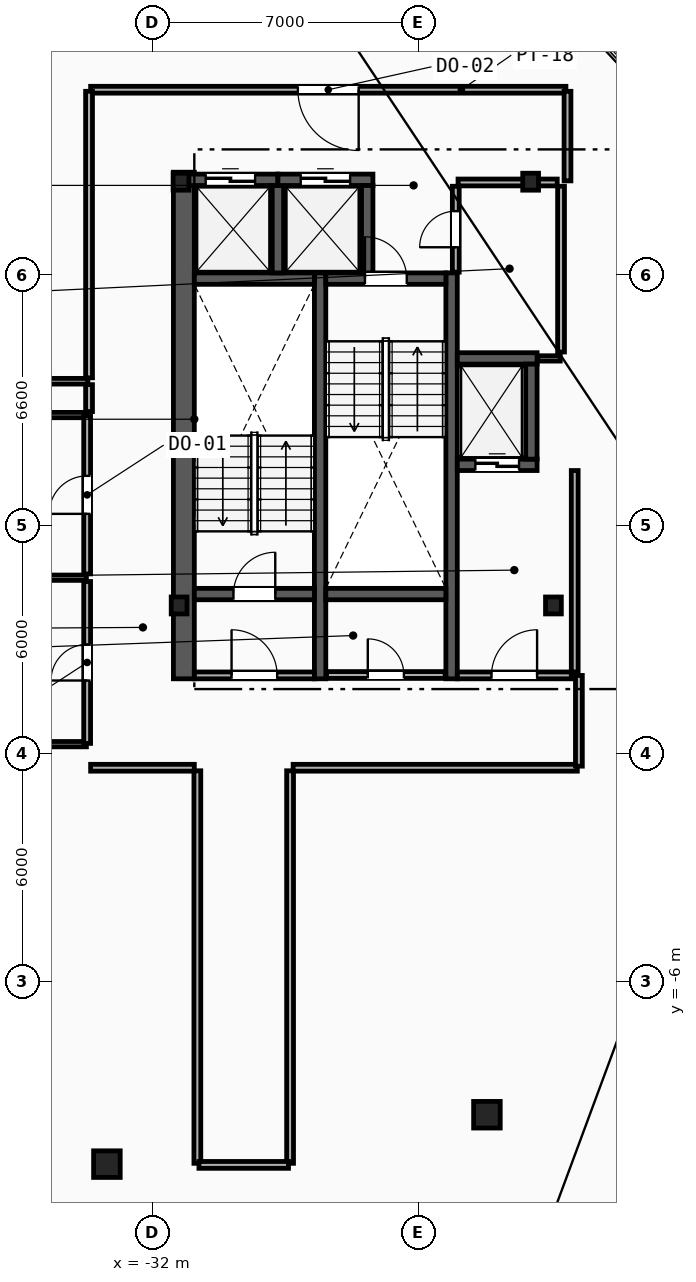
"""IFC4 building model, lengths in metres.
Left out: names, types, materials, properties, quantities, classifications, styles, units other than length and angle.
Written with IfcOpenShell. Run it as: python <this file> out.ifc"""

import sys

from ifc_helpers import new_model, si_unit, direction, frame, frame_2d, origin, origin_2d, place, context, subcontext, project, spatial, rectangle, i_section, extrude, element, fill, save


model = new_model("IFC4")
c1 = context("Model", 3, precision=1e-05, world=origin(), true_north=direction((0.0, 1.0)))
c2 = subcontext(c1, "Body", "Model", "MODEL_VIEW")
j1 = project(units=[si_unit("LENGTHUNIT", "METRE"), si_unit("PLANEANGLEUNIT", "RADIAN")], contexts=[c1])
p1 = place(None, origin())
s1 = spatial("IfcSite", under=j1, at=p1, CompositionType="ELEMENT")
p2 = place(p1, origin())
s2 = spatial("IfcBuilding", under=s1, at=p2, CompositionType="ELEMENT")
p3 = place(p2, frame((0.0, 0.0, 275.6)))
s3 = spatial("IfcBuildingStorey", under=s2, at=p3, CompositionType="ELEMENT", Elevation=275.6)
for number, where, z_axis, x_axis in (
    (1, (-31.3, 3.9, 0.0), (0.0, 0.0, 1.0), (1.0, 0.0, 0.0)),
    (2, (-21.45, 3.9, 0.0), (0.0, 0.0, 1.0), (1.0, 0.0, 0.0)),
    (3, (-22.05, 15.05, 0.0), (0.0, 0.0, 1.0), (1.0, 0.0, 0.0)),
    (4, (-31.25, 15.05, 0.0), (0.0, 0.0, 1.0), (1.0, 0.0, 0.0)),
):
    element("IfcColumn", number, at=place(p3, frame(where, z_axis=z_axis, x_axis=x_axis)), inside=s3, PredefinedType="COLUMN", context=c2, shape_type="SweptSolid", body=[
        extrude(i_section(OverallWidth=0.416, OverallDepth=0.446, WebThickness=0.039, FlangeThickness=0.063, FilletRadius=0.018, at=origin_2d()), origin(), (0.0, 0.0, 1.0), 3.6),
    ])
for number, where, z_axis, x_axis in (
    (5, (-33.2, -10.8, 0.0), (0.0, 0.0, 1.0), (1.0, 0.0, 0.0)),
    (6, (-23.2, -9.5, 0.0), (0.0, 0.0, 1.0), (1.0, 0.0, 0.0)),
):
    element("IfcColumn", number, at=place(p3, frame(where, z_axis=z_axis, x_axis=x_axis)), inside=s3, PredefinedType="COLUMN", context=c2, shape_type="SweptSolid", body=[
        extrude(rectangle(XDim=0.7, YDim=0.7, at=origin_2d()), origin(), (0.0, 0.0, 1.0), 3.6),
    ])
p4 = place(p3, frame((-31.175, 1.97, 0.0), z_axis=(0.0, 0.0, 1.0), x_axis=(0.0, 1.0, 0.0)))
e7 = element("IfcWall", 7, at=p4, inside=s3, PredefinedType="SHEAR", context=c2, shape_type="SweptSolid", body=[
    extrude(rectangle(XDim=13.33, YDim=0.55, at=frame_2d((6.665, 0.0))), origin(), (0.0, 0.0, 1.0), 3.34),
])
for number, where, z_axis, x_axis in (
    (8, (-27.59, 1.97, 0.0), (0.0, 0.0, 1.0), (0.0, 1.0, 0.0)),
    (9, (-24.13, 1.97, 0.0), (0.0, 0.0, 1.0), (0.0, 1.0, 0.0)),
):
    element("IfcWall", number, at=place(p3, frame(where, z_axis=z_axis, x_axis=x_axis)), inside=s3, PredefinedType="SHEAR", context=c2, shape_type="SweptSolid", body=[
        extrude(rectangle(XDim=10.68, YDim=0.3, at=frame_2d((5.34, 0.0))), origin(), (0.0, 0.0, 1.0), 3.34),
    ])
p5 = place(p3, frame((-30.9, 4.2, 0.0), z_axis=(0.0, 0.0, 1.0), x_axis=(1.0, 0.0, 0.0)))
e10 = element("IfcWall", 10, at=p5, inside=s3, PredefinedType="SHEAR", context=c2, shape_type="SweptSolid", body=[
    extrude(rectangle(XDim=3.16, YDim=0.3, at=frame_2d((1.58, 0.0))), origin(), (0.0, 0.0, 1.0), 3.34),
])
p6 = place(p5, frame((1.03, 0.0, 0.0)))
e11 = element("IfcOpeningElement", 11, at=p6, cuts=e10, PredefinedType="OPENING", context=c2, shape_type="SweptSolid", body=[
    extrude(rectangle(XDim=1.1, YDim=2.15, at=frame_2d((0.55, 1.075))), frame((0.0, 0.16, 0.0), z_axis=(0.0, -1.0, 0.0), x_axis=(1.0, 0.0, 0.0)), (0.0, 0.0, 1.0), 0.32),
])
p7 = place(p3, frame((-30.9, 12.5, 0.0), z_axis=(0.0, 0.0, 1.0), x_axis=(1.0, 0.0, 0.0)))
e12 = element("IfcWall", 12, at=p7, inside=s3, PredefinedType="SHEAR", context=c2, shape_type="SweptSolid", body=[
    extrude(rectangle(XDim=3.16, YDim=0.3, at=frame_2d((1.58, 0.0))), origin(), (0.0, 0.0, 1.0), 3.34),
])
p8 = place(p3, frame((-27.44, 12.5, 0.0), z_axis=(0.0, 0.0, 1.0), x_axis=(1.0, 0.0, 0.0)))
e13 = element("IfcWall", 13, at=p8, inside=s3, PredefinedType="SHEAR", context=c2, shape_type="SweptSolid", body=[
    extrude(rectangle(XDim=3.16, YDim=0.3, at=frame_2d((1.58, 0.0))), origin(), (0.0, 0.0, 1.0), 3.34),
])
p9 = place(p8, frame((1.03, 0.0, 0.0)))
e14 = element("IfcOpeningElement", 14, at=p9, cuts=e13, PredefinedType="OPENING", context=c2, shape_type="SweptSolid", body=[
    extrude(rectangle(XDim=1.1, YDim=2.15, at=frame_2d((0.55, 1.075))), frame((0.0, 0.16, 0.0), z_axis=(0.0, -1.0, 0.0), x_axis=(1.0, 0.0, 0.0)), (0.0, 0.0, 1.0), 0.32),
])
p10 = place(p3, frame((-27.44, 4.2, 0.0), z_axis=(0.0, 0.0, 1.0), x_axis=(1.0, 0.0, 0.0)))
e15 = element("IfcWall", 15, at=p10, inside=s3, PredefinedType="SHEAR", context=c2, shape_type="SweptSolid", body=[
    extrude(rectangle(XDim=3.16, YDim=0.3, at=frame_2d((1.58, 0.0))), origin(), (0.0, 0.0, 1.0), 3.34),
])
p11 = place(p3, frame((-20.89, 2.15, 0.0), z_axis=(0.0, 0.0, 1.0), x_axis=(0.0, 1.0, 0.0)))
e16 = element("IfcWall", 16, at=p11, inside=s3, PredefinedType="PARTITIONING", context=c2, shape_type="SweptSolid", body=[
    extrude(rectangle(XDim=5.3, YDim=0.18, at=frame_2d((2.65, 0.0))), origin(), (0.0, 0.0, 1.0), 3.34),
])
p12 = place(p3, frame((-23.98, 2.06, 0.0), z_axis=(0.0, 0.0, 1.0), x_axis=(1.0, 0.0, 0.0)))
e17 = element("IfcWall", 17, at=p12, inside=s3, PredefinedType="PARTITIONING", context=c2, shape_type="SweptSolid", body=[
    extrude(rectangle(XDim=3.0, YDim=0.18, at=frame_2d((1.5, 0.0))), origin(), (0.0, 0.0, 1.0), 3.34),
])
p13 = place(p12, frame((0.9, 0.0, 0.0)))
e18 = element("IfcOpeningElement", 18, at=p13, cuts=e17, PredefinedType="OPENING", context=c2, shape_type="SweptSolid", body=[
    extrude(rectangle(XDim=1.2, YDim=2.15, at=frame_2d((0.6, 1.075))), frame((0.0, 0.1, 0.0), z_axis=(0.0, -1.0, 0.0), x_axis=(1.0, 0.0, 0.0)), (0.0, 0.0, 1.0), 0.2),
])
p14 = place(p3, frame((-30.9, 2.06, 0.0), z_axis=(0.0, 0.0, 1.0), x_axis=(1.0, 0.0, 0.0)))
e19 = element("IfcWall", 19, at=p14, inside=s3, PredefinedType="PARTITIONING", context=c2, shape_type="SweptSolid", body=[
    extrude(rectangle(XDim=3.16, YDim=0.18, at=frame_2d((1.58, 0.0))), origin(), (0.0, 0.0, 1.0), 3.34),
])
p15 = place(p14, frame((0.98, 0.0, 0.0)))
e20 = element("IfcOpeningElement", 20, at=p15, cuts=e19, PredefinedType="OPENING", context=c2, shape_type="SweptSolid", body=[
    extrude(rectangle(XDim=1.2, YDim=2.15, at=frame_2d((0.6, 1.075))), frame((0.0, 0.1, 0.0), z_axis=(0.0, -1.0, 0.0), x_axis=(1.0, 0.0, 0.0)), (0.0, 0.0, 1.0), 0.2),
])
p16 = place(p3, frame((-23.98, 7.6, 0.0), z_axis=(0.0, 0.0, 1.0), x_axis=(1.0, 0.0, 0.0)))
e21 = element("IfcWall", 21, at=p16, inside=s3, PredefinedType="SHEAR", context=c2, shape_type="SweptSolid", body=[
    extrude(rectangle(XDim=2.1, YDim=0.3, at=frame_2d((1.05, 0.0))), origin(), (0.0, 0.0, 1.0), 3.34),
])
p17 = place(p16, frame((0.475, 0.0, 0.0)))
e22 = element("IfcOpeningElement", 22, at=p17, cuts=e21, PredefinedType="OPENING", context=c2, shape_type="SweptSolid", body=[
    extrude(rectangle(XDim=1.15, YDim=2.2, at=frame_2d((0.575, 1.1))), frame((0.0, 0.16, 0.0), z_axis=(0.0, -1.0, 0.0), x_axis=(1.0, 0.0, 0.0)), (0.0, 0.0, 1.0), 0.32),
])
p18 = place(p3, frame((-23.98, 10.4, 0.0), z_axis=(0.0, 0.0, 1.0), x_axis=(1.0, 0.0, 0.0)))
e23 = element("IfcWall", 23, at=p18, inside=s3, PredefinedType="SHEAR", context=c2, shape_type="SweptSolid", body=[
    extrude(rectangle(XDim=2.1, YDim=0.3, at=frame_2d((1.05, 0.0))), origin(), (0.0, 0.0, 1.0), 3.34),
])
p19 = place(p3, frame((-22.03, 7.75, 0.0), z_axis=(0.0, 0.0, 1.0), x_axis=(0.0, 1.0, 0.0)))
e24 = element("IfcWall", 24, at=p19, inside=s3, PredefinedType="SHEAR", context=c2, shape_type="SweptSolid", body=[
    extrude(rectangle(XDim=2.5, YDim=0.3, at=frame_2d((1.25, 0.0))), origin(), (0.0, 0.0, 1.0), 3.34),
])
p20 = place(p3, frame((-31.2, 15.1, 0.0), z_axis=(0.0, 0.0, 1.0), x_axis=(1.0, 0.0, 0.0)))
e25 = element("IfcWall", 25, at=p20, inside=s3, PredefinedType="SHEAR", context=c2, shape_type="SweptSolid", body=[
    extrude(rectangle(XDim=2.5, YDim=0.3, at=frame_2d((1.25, 0.0))), origin(), (0.0, 0.0, 1.0), 3.34),
])
p21 = place(p20, frame((0.6, 0.0, 0.0)))
e26 = element("IfcOpeningElement", 26, at=p21, cuts=e25, PredefinedType="OPENING", context=c2, shape_type="SweptSolid", body=[
    extrude(rectangle(XDim=1.3, YDim=2.2, at=frame_2d((0.65, 1.1))), frame((0.0, 0.16, 0.0), z_axis=(0.0, -1.0, 0.0), x_axis=(1.0, 0.0, 0.0)), (0.0, 0.0, 1.0), 0.32),
])
p22 = place(p3, frame((-28.7, 12.65, 0.0), z_axis=(0.0, 0.0, 1.0), x_axis=(0.0, 1.0, 0.0)))
e27 = element("IfcWall", 27, at=p22, inside=s3, PredefinedType="SHEAR", context=c2, shape_type="SweptSolid", body=[
    extrude(rectangle(XDim=2.3, YDim=0.3, at=frame_2d((1.15, 0.0))), origin(), (0.0, 0.0, 1.0), 3.34),
])
p23 = place(p3, frame((-28.7, 15.1, 0.0), z_axis=(0.0, 0.0, 1.0), x_axis=(1.0, 0.0, 0.0)))
e28 = element("IfcWall", 28, at=p23, inside=s3, PredefinedType="SHEAR", context=c2, shape_type="SweptSolid", body=[
    extrude(rectangle(XDim=2.5, YDim=0.3, at=frame_2d((1.25, 0.0))), origin(), (0.0, 0.0, 1.0), 3.34),
])
p24 = place(p23, frame((0.6, 0.0, 0.0)))
e29 = element("IfcOpeningElement", 29, at=p24, cuts=e28, PredefinedType="OPENING", context=c2, shape_type="SweptSolid", body=[
    extrude(rectangle(XDim=1.3, YDim=2.2, at=frame_2d((0.65, 1.1))), frame((0.0, 0.16, 0.0), z_axis=(0.0, -1.0, 0.0), x_axis=(1.0, 0.0, 0.0)), (0.0, 0.0, 1.0), 0.32),
])
p25 = place(p3, frame((-26.35, 12.65, 0.0), z_axis=(0.0, 0.0, 1.0), x_axis=(0.0, 1.0, 0.0)))
e30 = element("IfcWall", 30, at=p25, inside=s3, PredefinedType="SHEAR", context=c2, shape_type="SweptSolid", body=[
    extrude(rectangle(XDim=2.3, YDim=0.3, at=frame_2d((1.15, 0.0))), origin(), (0.0, 0.0, 1.0), 3.34),
])
p26 = place(p3, frame((-21.86, 10.4, 0.0), z_axis=(0.0, 0.0, 1.0), x_axis=(1.0, 0.0, 0.0)))
e31 = element("IfcWall", 31, at=p26, inside=s3, PredefinedType="PARTITIONING", context=c2, shape_type="SweptSolid", body=[
    extrude(rectangle(XDim=0.59, YDim=0.14, at=frame_2d((0.295, 0.0))), origin(), (0.0, 0.0, 1.0), 3.34),
])
p27 = place(p3, frame((-21.25, 10.57, 0.0), z_axis=(0.0, 0.0, 1.0), x_axis=(0.0, 1.0, 0.0)))
e32 = element("IfcWall", 32, at=p27, inside=s3, PredefinedType="PARTITIONING", context=c2, shape_type="SweptSolid", body=[
    extrude(rectangle(XDim=4.36, YDim=0.18, at=frame_2d((2.18, 0.0))), origin(), (0.0, 0.0, 1.0), 3.34),
])
p28 = place(p3, frame((-23.96, 15.03, 0.0), z_axis=(0.0, 0.0, 1.0), x_axis=(1.0, 0.0, 0.0)))
e33 = element("IfcWall", 33, at=p28, inside=s3, PredefinedType="PARTITIONING", context=c2, shape_type="SweptSolid", body=[
    extrude(rectangle(XDim=2.61, YDim=0.18, at=frame_2d((1.305, 0.0))), origin(), (0.0, 0.0, 1.0), 2.413),
])
p29 = place(p3, frame((-27.42, 2.07, 0.0), z_axis=(0.0, 0.0, 1.0), x_axis=(1.0, 0.0, 0.0)))
e34 = element("IfcWall", 34, at=p29, inside=s3, PredefinedType="PARTITIONING", context=c2, shape_type="SweptSolid", body=[
    extrude(rectangle(XDim=3.12, YDim=0.18, at=frame_2d((1.56, 0.0))), origin(), (0.0, 0.0, 1.0), 3.34),
])
p30 = place(p29, frame((1.085, 0.0, 0.0)))
e35 = element("IfcOpeningElement", 35, at=p30, cuts=e34, PredefinedType="OPENING", context=c2, shape_type="SweptSolid", body=[
    extrude(rectangle(XDim=0.95, YDim=2.1, at=frame_2d((0.475, 1.05))), frame((0.0, 0.1, 0.0), z_axis=(0.0, -1.0, 0.0), x_axis=(1.0, 0.0, 0.0)), (0.0, 0.0, 1.0), 0.2),
])
p31 = place(p3, frame((-24.02, 12.67, 0.0), z_axis=(0.0, 0.0, 1.0), x_axis=(0.0, 1.0, 0.0)))
e36 = element("IfcWall", 36, at=p31, inside=s3, PredefinedType="PARTITIONING", context=c2, shape_type="SweptSolid", body=[
    extrude(rectangle(XDim=2.26, YDim=0.18, at=frame_2d((1.13, 0.0))), origin(), (0.0, 0.0, 1.0), 3.34),
])
p32 = place(p31, frame((0.655, 0.0, 0.0)))
e37 = element("IfcOpeningElement", 37, at=p32, cuts=e36, PredefinedType="OPENING", context=c2, shape_type="SweptSolid", body=[
    extrude(rectangle(XDim=0.95, YDim=2.1, at=frame_2d((0.475, 1.05))), frame((0.0, 0.1, 0.0), z_axis=(0.0, -1.0, 0.0), x_axis=(1.0, 0.0, 0.0)), (0.0, 0.0, 1.0), 0.2),
])
for number, where, z_axis, x_axis in (
    (38, (-38.22, 0.25, 0.0), (0.0, 0.0, 1.0), (1.0, 0.0, 0.0)),
    (39, (-38.22, 4.63, 0.0), (0.0, 0.0, 1.0), (1.0, 0.0, 0.0)),
    (40, (-38.22, 8.91, 0.0), (0.0, 0.0, 1.0), (1.0, 0.0, 0.0)),
):
    element("IfcWall", number, at=place(p3, frame(where, z_axis=z_axis, x_axis=x_axis)), inside=s3, PredefinedType="PARTITIONING", context=c2, shape_type="SweptSolid", body=[
        extrude(rectangle(XDim=4.48, YDim=0.14, at=frame_2d((2.24, 0.0))), origin(), (0.0, 0.0, 1.0), 3.34),
    ])
p33 = place(p3, frame((-33.72, 0.27, 0.0), z_axis=(0.0, 0.0, 1.0), x_axis=(0.0, 1.0, 0.0)))
e41 = element("IfcWall", 41, at=p33, inside=s3, PredefinedType="PARTITIONING", context=c2, shape_type="SweptSolid", body=[
    extrude(rectangle(XDim=4.26, YDim=0.18, at=frame_2d((2.13, 0.0))), origin(), (0.0, 0.0, 1.0), 3.34),
])
p34 = place(p33, frame((1.655, 0.0, 0.0)))
e42 = element("IfcOpeningElement", 42, at=p34, cuts=e41, PredefinedType="OPENING", context=c2, shape_type="SweptSolid", body=[
    extrude(rectangle(XDim=0.95, YDim=2.1, at=frame_2d((0.475, 1.05))), frame((0.0, 0.1, 0.0), z_axis=(0.0, -1.0, 0.0), x_axis=(1.0, 0.0, 0.0)), (0.0, 0.0, 1.0), 0.2),
])
p35 = place(p3, frame((-33.72, 4.73, 0.0), z_axis=(0.0, 0.0, 1.0), x_axis=(0.0, 1.0, 0.0)))
e43 = element("IfcWall", 43, at=p35, inside=s3, PredefinedType="PARTITIONING", context=c2, shape_type="SweptSolid", body=[
    extrude(rectangle(XDim=4.16, YDim=0.18, at=frame_2d((2.08, 0.0))), origin(), (0.0, 0.0, 1.0), 3.34),
])
p36 = place(p35, frame((1.58, 0.0, 0.0)))
e44 = element("IfcOpeningElement", 44, at=p36, cuts=e43, PredefinedType="OPENING", context=c2, shape_type="SweptSolid", body=[
    extrude(rectangle(XDim=1.0, YDim=2.15, at=frame_2d((0.5, 1.075))), frame((0.0, 0.1, 0.0), z_axis=(0.0, -1.0, 0.0), x_axis=(1.0, 0.0, 0.0)), (0.0, 0.0, 1.0), 0.2),
])
p37 = place(p3, frame((-48.38, 9.8, 0.0), z_axis=(0.0, 0.0, 1.0), x_axis=(1.0, 0.0, 0.0)))
e45 = element("IfcWall", 45, at=p37, inside=s3, PredefinedType="PARTITIONING", context=c2, shape_type="SweptSolid", body=[
    extrude(rectangle(XDim=14.68, YDim=0.15, at=frame_2d((7.34, 0.0))), origin(), (0.0, 0.0, 1.0), 3.34),
])
p38 = place(p3, frame((-21.122, 17.47, 0.0), z_axis=(0.0, 0.0, 1.0), x_axis=(-1.0, 0.0, 0.0)))
e46 = element("IfcWall", 46, at=p38, inside=s3, PredefinedType="PARTITIONING", context=c2, shape_type="SweptSolid", body=[
    extrude(rectangle(XDim=12.507, YDim=0.18, at=frame_2d((6.253, 0.0))), origin(), (0.0, 0.0, 1.0), 3.34),
])
p39 = place(p38, frame((5.454, 0.0, 0.0)))
e47 = element("IfcOpeningElement", 47, at=p39, cuts=e46, PredefinedType="OPENING", context=c2, shape_type="SweptSolid", body=[
    extrude(rectangle(XDim=1.6, YDim=2.2, at=frame_2d((0.8, 1.1))), frame((0.0, 0.1, 0.0), z_axis=(0.0, -1.0, 0.0), x_axis=(1.0, 0.0, 0.0)), (0.0, 0.0, 1.0), 0.2),
])
for number, where, z_axis, x_axis in (
    (48, (-30.82, -0.45, 0.0), (0.0, 0.0, 1.0), (0.0, -1.0, 0.0)),
    (49, (-28.38, -10.779, 0.0), (0.0, 0.0, 1.0), (0.0, 1.0, 0.0)),
):
    element("IfcWall", number, at=place(p3, frame(where, z_axis=z_axis, x_axis=x_axis)), inside=s3, PredefinedType="PARTITIONING", context=c2, shape_type="SweptSolid", body=[
        extrude(rectangle(XDim=10.329, YDim=0.18, at=frame_2d((5.164, 0.0))), origin(), (0.0, 0.0, 1.0), 3.34),
    ])
p40 = place(p3, frame((-33.67, 17.428, 0.0), z_axis=(0.0, 0.0, 1.0), x_axis=(0.0, -1.0, 0.0)))
e50 = element("IfcWall", 50, at=p40, inside=s3, PredefinedType="PARTITIONING", context=c2, shape_type="SweptSolid", body=[
    extrude(rectangle(XDim=7.539, YDim=0.18, at=frame_2d((3.769, 0.0))), origin(), (0.0, 0.0, 1.0), 3.34),
])
p41 = place(p3, frame((-28.3, -0.37, 0.0), z_axis=(0.0, 0.0, 1.0), x_axis=(1.0, 0.0, 0.0)))
e51 = element("IfcWall", 51, at=p41, inside=s3, PredefinedType="PARTITIONING", context=c2, shape_type="SweptSolid", body=[
    extrude(rectangle(XDim=7.479, YDim=0.18, at=frame_2d((3.739, 0.0))), origin(), (0.0, 0.0, 1.0), 3.34),
])
p42 = place(p3, frame((-33.628, -0.37, 0.0), z_axis=(0.0, 0.0, 1.0), x_axis=(1.0, 0.0, 0.0)))
e52 = element("IfcWall", 52, at=p42, inside=s3, PredefinedType="PARTITIONING", context=c2, shape_type="SweptSolid", body=[
    extrude(rectangle(XDim=2.729, YDim=0.18, at=frame_2d((1.364, 0.0))), origin(), (0.0, 0.0, 1.0), 3.34),
])
p43 = place(p3, frame((-20.78, -0.329, 0.0), z_axis=(0.0, 0.0, 1.0), x_axis=(0.0, 1.0, 0.0)))
e53 = element("IfcWall", 53, at=p43, inside=s3, PredefinedType="PARTITIONING", context=c2, shape_type="SweptSolid", body=[
    extrude(rectangle(XDim=2.387, YDim=0.18, at=frame_2d((1.194, 0.0))), origin(), (0.0, 0.0, 1.0), 3.34),
])
p44 = place(p3, frame((-30.779, -10.82, 0.0), z_axis=(0.0, 0.0, 1.0), x_axis=(1.0, 0.0, 0.0)))
e54 = element("IfcWall", 54, at=p44, inside=s3, PredefinedType="PARTITIONING", context=c2, shape_type="SweptSolid", body=[
    extrude(rectangle(XDim=2.357, YDim=0.18, at=frame_2d((1.179, 0.0))), origin(), (0.0, 0.0, 1.0), 3.34),
])
p45 = place(p3, frame((-21.08, 15.072, 0.0), z_axis=(0.0, 0.0, 1.0), x_axis=(0.0, 1.0, 0.0)))
e55 = element("IfcWall", 55, at=p45, inside=s3, PredefinedType="PARTITIONING", context=c2, shape_type="SweptSolid", body=[
    extrude(rectangle(XDim=2.357, YDim=0.18, at=frame_2d((1.178, 0.0))), origin(), (0.0, 0.0, 1.0), 3.34),
])
p46 = place(p3, frame((-33.67, 9.71, 0.0), z_axis=(0.0, 0.0, 1.0), x_axis=(0.0, -1.0, 0.0)))
e56 = element("IfcWall", 56, at=p46, inside=s3, PredefinedType="PARTITIONING", context=c2, shape_type="SweptSolid", body=[
    extrude(rectangle(XDim=0.708, YDim=0.18, at=frame_2d((0.354, 0.0))), origin(), (0.0, 0.0, 1.0), 3.34),
])
p47 = place(p6, origin())
e57 = element("IfcDoor", 57, at=p47, inside=s3, OperationType="SINGLE_SWING_RIGHT", PredefinedType="DOOR", context=c2, shape_type="SweptSolid", body=[
    extrude(rectangle(XDim=1.1, YDim=2.15, at=frame_2d((0.55, 1.075))), frame((0.0, 0.025, 0.0), z_axis=(0.0, -1.0, 0.0), x_axis=(1.0, 0.0, 0.0)), (0.0, 0.0, 1.0), 0.05),
])
fill(e11, e57)
p48 = place(p9, origin())
e58 = element("IfcDoor", 58, at=p48, inside=s3, OperationType="SINGLE_SWING_LEFT", PredefinedType="DOOR", context=c2, shape_type="SweptSolid", body=[
    extrude(rectangle(XDim=1.1, YDim=2.15, at=frame_2d((0.55, 1.075))), frame((0.0, 0.025, 0.0), z_axis=(0.0, -1.0, 0.0), x_axis=(1.0, 0.0, 0.0)), (0.0, 0.0, 1.0), 0.05),
])
fill(e14, e58)
p49 = place(p13, origin())
e59 = element("IfcDoor", 59, at=p49, inside=s3, OperationType="SINGLE_SWING_RIGHT", PredefinedType="DOOR", context=c2, shape_type="SweptSolid", body=[
    extrude(rectangle(XDim=1.2, YDim=2.15, at=frame_2d((0.6, 1.075))), frame((0.0, 0.025, 0.0), z_axis=(0.0, -1.0, 0.0), x_axis=(1.0, 0.0, 0.0)), (0.0, 0.0, 1.0), 0.05),
])
fill(e18, e59)
p50 = place(p15, origin())
e60 = element("IfcDoor", 60, at=p50, inside=s3, OperationType="SINGLE_SWING_LEFT", PredefinedType="DOOR", context=c2, shape_type="SweptSolid", body=[
    extrude(rectangle(XDim=1.2, YDim=2.15, at=frame_2d((0.6, 1.075))), frame((0.0, 0.025, 0.0), z_axis=(0.0, -1.0, 0.0), x_axis=(1.0, 0.0, 0.0)), (0.0, 0.0, 1.0), 0.05),
])
fill(e20, e60)
p51 = place(p17, origin())
e61 = element("IfcDoor", 61, at=p51, inside=s3, OperationType="SLIDING_TO_LEFT", PredefinedType="TRAPDOOR", context=c2, shape_type="SweptSolid", body=[
    extrude(rectangle(XDim=1.15, YDim=2.2, at=frame_2d((0.575, 1.1))), frame((0.0, 0.025, 0.0), z_axis=(0.0, -1.0, 0.0), x_axis=(1.0, 0.0, 0.0)), (0.0, 0.0, 1.0), 0.05),
])
fill(e22, e61)
p52 = place(p21, origin())
e62 = element("IfcDoor", 62, at=p52, inside=s3, OperationType="SLIDING_TO_LEFT", PredefinedType="TRAPDOOR", context=c2, shape_type="SweptSolid", body=[
    extrude(rectangle(XDim=1.3, YDim=2.2, at=frame_2d((0.65, 1.1))), frame((0.0, 0.025, 0.0), z_axis=(0.0, -1.0, 0.0), x_axis=(1.0, 0.0, 0.0)), (0.0, 0.0, 1.0), 0.05),
])
fill(e26, e62)
p53 = place(p24, origin())
e63 = element("IfcDoor", 63, at=p53, inside=s3, OperationType="SLIDING_TO_LEFT", PredefinedType="TRAPDOOR", context=c2, shape_type="SweptSolid", body=[
    extrude(rectangle(XDim=1.3, YDim=2.2, at=frame_2d((0.65, 1.1))), frame((0.0, 0.025, 0.0), z_axis=(0.0, -1.0, 0.0), x_axis=(1.0, 0.0, 0.0)), (0.0, 0.0, 1.0), 0.05),
])
fill(e29, e63)
p54 = place(p39, origin())
e64 = element("IfcDoor", 64, at=p54, inside=s3, OperationType="SINGLE_SWING_LEFT", PredefinedType="DOOR", context=c2, shape_type="SweptSolid", body=[
    extrude(rectangle(XDim=1.6, YDim=2.2, at=frame_2d((0.8, 1.1))), frame((0.0, 0.025, 0.0), z_axis=(0.0, -1.0, 0.0), x_axis=(1.0, 0.0, 0.0)), (0.0, 0.0, 1.0), 0.05),
])
fill(e47, e64)
p55 = place(p34, origin())
e65 = element("IfcDoor", 65, at=p55, inside=s3, OperationType="SINGLE_SWING_LEFT", PredefinedType="DOOR", context=c2, shape_type="SweptSolid", body=[
    extrude(rectangle(XDim=0.95, YDim=2.1, at=frame_2d((0.475, 1.05))), frame((0.0, 0.025, 0.0), z_axis=(0.0, -1.0, 0.0), x_axis=(1.0, 0.0, 0.0)), (0.0, 0.0, 1.0), 0.05),
])
fill(e42, e65)
p56 = place(p36, origin())
e66 = element("IfcDoor", 66, at=p56, inside=s3, OperationType="SINGLE_SWING_LEFT", PredefinedType="DOOR", context=c2, shape_type="SweptSolid", body=[
    extrude(rectangle(XDim=1.0, YDim=2.15, at=frame_2d((0.5, 1.075))), frame((0.0, 0.025, 0.0), z_axis=(0.0, -1.0, 0.0), x_axis=(1.0, 0.0, 0.0)), (0.0, 0.0, 1.0), 0.05),
])
fill(e44, e66)
p57 = place(p30, origin())
e67 = element("IfcDoor", 67, at=p57, inside=s3, OperationType="SINGLE_SWING_LEFT", PredefinedType="DOOR", context=c2, shape_type="SweptSolid", body=[
    extrude(rectangle(XDim=0.95, YDim=2.1, at=frame_2d((0.475, 1.05))), frame((0.0, 0.025, 0.0), z_axis=(0.0, -1.0, 0.0), x_axis=(1.0, 0.0, 0.0)), (0.0, 0.0, 1.0), 0.05),
])
fill(e35, e67)
p58 = place(p32, origin())
e68 = element("IfcDoor", 68, at=p58, inside=s3, OperationType="SINGLE_SWING_LEFT", PredefinedType="DOOR", context=c2, shape_type="SweptSolid", body=[
    extrude(rectangle(XDim=0.95, YDim=2.1, at=frame_2d((0.475, 1.05))), frame((0.0, 0.025, 0.0), z_axis=(0.0, -1.0, 0.0), x_axis=(1.0, 0.0, 0.0)), (0.0, 0.0, 1.0), 0.05),
])
fill(e37, e68)
save(model, sys.argv[1])
